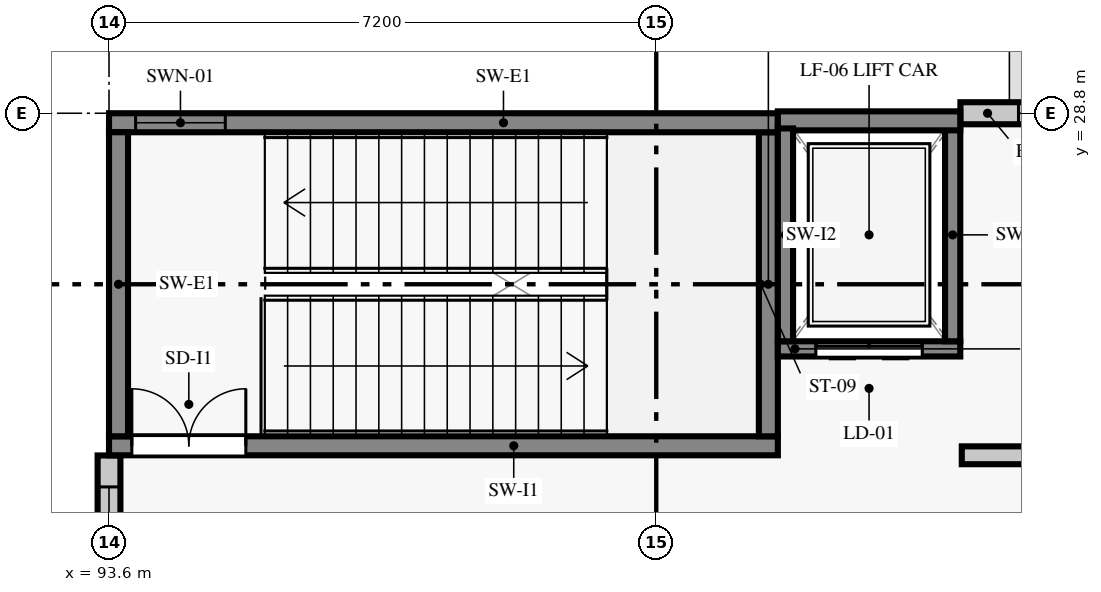
"""IFC4 building model, lengths in metres.
Left out: names, types, materials, properties, quantities, classifications, styles, units other than length and angle.
Written with IfcOpenShell. Run it as: python <this file> out.ifc"""

import sys

from ifc_helpers import new_model, si_unit, direction, frame, frame_2d, origin, place, context, subcontext, project, spatial, rectangle, extrude, element, fill, save


model = new_model("IFC4")
c1 = context("Model", 3, precision=1e-05, world=origin(), true_north=direction((0.0, 1.0)))
c2 = subcontext(c1, "Body", "Model", "MODEL_VIEW")
j1 = project(units=[si_unit("LENGTHUNIT", "METRE"), si_unit("PLANEANGLEUNIT", "RADIAN")], contexts=[c1])
p1 = place(None, origin())
s1 = spatial("IfcSite", under=j1, at=p1, CompositionType="ELEMENT")
p2 = place(p1, origin())
s2 = spatial("IfcBuilding", under=s1, at=p2, CompositionType="ELEMENT")
p3 = place(p2, frame((0.0, 0.0, 4.8)))
s3 = spatial("IfcBuildingStorey", under=s2, at=p3, CompositionType="ELEMENT", Elevation=4.8)
p4 = place(p3, frame((107.68, 28.8, 0.0), z_axis=(0.0, 0.0, 1.0), x_axis=(-1.0, 0.0, 0.0)))
e1 = element("IfcWall", 1, at=p4, inside=s3, PredefinedType="STANDARD", context=c2, shape_type="SweptSolid", body=[
    extrude(rectangle(XDim=2.878, YDim=0.29, at=frame_2d((1.439, 0.0))), origin(), (0.0, 0.0, 1.0), 4.49),
])
p5 = place(p4, frame((0.764, 0.0, 0.9)))
e2 = element("IfcOpeningElement", 2, at=p5, cuts=e1, PredefinedType="OPENING", context=c2, shape_type="SweptSolid", body=[
    extrude(rectangle(XDim=1.35, YDim=1.78, at=frame_2d((0.675, 0.89))), frame((0.0, 0.155, 0.0), z_axis=(0.0, -1.0, 0.0), x_axis=(1.0, 0.0, 0.0)), (0.0, 0.0, 1.0), 0.31),
])
p6 = place(p3, frame((93.6, 24.298, 0.0), z_axis=(0.0, 0.0, 1.0), x_axis=(0.0, -1.0, 0.0)))
e3 = element("IfcWall", 3, at=p6, inside=s3, PredefinedType="STANDARD", context=c2, shape_type="SweptSolid", body=[
    extrude(rectangle(XDim=2.378, YDim=0.3, at=frame_2d((1.189, 0.0))), origin(), (0.0, 0.0, 1.0), 4.49),
])
p7 = place(p6, frame((0.414, 0.0, 0.9)))
e4 = element("IfcOpeningElement", 4, at=p7, cuts=e3, PredefinedType="OPENING", context=c2, shape_type="SweptSolid", body=[
    extrude(rectangle(XDim=1.55, YDim=1.78, at=frame_2d((0.775, 0.89))), frame((0.0, 0.16, 0.0), z_axis=(0.0, -1.0, 0.0), x_axis=(1.0, 0.0, 0.0)), (0.0, 0.0, 1.0), 0.32),
])
p8 = place(p3, frame((93.6, 24.425, 0.0), z_axis=(0.0, 0.0, 1.0), x_axis=(1.0, 0.0, 0.0)))
e5 = element("IfcWall", 5, at=p8, inside=s3, PredefinedType="SHEAR", context=c2, shape_type="SweptSolid", body=[
    extrude(rectangle(XDim=8.8, YDim=0.25, at=frame_2d((4.4, 0.0))), origin(), (0.0, 0.0, 1.0), 4.49),
])
p9 = place(p8, frame((0.3, 0.0, 0.0)))
e6 = element("IfcOpeningElement", 6, at=p9, cuts=e5, PredefinedType="OPENING", context=c2, shape_type="SweptSolid", body=[
    extrude(rectangle(XDim=1.5, YDim=2.15, at=frame_2d((0.75, 1.075))), frame((0.0, 0.135, 0.0), z_axis=(0.0, -1.0, 0.0), x_axis=(1.0, 0.0, 0.0)), (0.0, 0.0, 1.0), 0.27),
])
p10 = place(p3, frame((102.275, 24.55, 0.0), z_axis=(0.0, 0.0, 1.0), x_axis=(0.0, 1.0, 0.0)))
e7 = element("IfcWall", 7, at=p10, inside=s3, PredefinedType="SHEAR", context=c2, shape_type="SweptSolid", body=[
    extrude(rectangle(XDim=4.0, YDim=0.25, at=frame_2d((2.0, 0.0))), origin(), (0.0, 0.0, 1.0), 4.49),
])
p11 = place(p3, frame((102.4, 28.675, 0.0), z_axis=(0.0, 0.0, 1.0), x_axis=(-1.0, 0.0, 0.0)))
e8 = element("IfcWall", 8, at=p11, inside=s3, PredefinedType="SHEAR", context=c2, shape_type="SweptSolid", body=[
    extrude(rectangle(XDim=8.8, YDim=0.25, at=frame_2d((4.4, 0.0))), origin(), (0.0, 0.0, 1.0), 4.49),
])
p12 = place(p11, frame((7.27, 0.0, 0.92)))
e9 = element("IfcOpeningElement", 9, at=p12, cuts=e8, PredefinedType="OPENING", context=c2, shape_type="SweptSolid", body=[
    extrude(rectangle(XDim=1.18, YDim=1.48, at=frame_2d((0.59, 0.74))), frame((0.0, 0.135, 0.0), z_axis=(0.0, -1.0, 0.0), x_axis=(1.0, 0.0, 0.0)), (0.0, 0.0, 1.0), 0.27),
])
p13 = place(p3, frame((93.725, 28.55, 0.0), z_axis=(0.0, 0.0, 1.0), x_axis=(0.0, -1.0, 0.0)))
e10 = element("IfcWall", 10, at=p13, inside=s3, PredefinedType="SHEAR", context=c2, shape_type="SweptSolid", body=[
    extrude(rectangle(XDim=4.0, YDim=0.25, at=frame_2d((2.0, 0.0))), origin(), (0.0, 0.0, 1.0), 4.49),
])
p14 = place(p3, frame((102.4, 25.7, 0.0), z_axis=(0.0, 0.0, 1.0), x_axis=(1.0, 0.0, 0.0)))
e11 = element("IfcWall", 11, at=p14, inside=s3, PredefinedType="SHEAR", context=c2, shape_type="SweptSolid", body=[
    extrude(rectangle(XDim=2.4, YDim=0.2, at=frame_2d((1.2, 0.0))), origin(), (0.0, 0.0, 1.0), 4.49),
])
p15 = place(p14, frame((0.5, 0.0, 0.0)))
e12 = element("IfcOpeningElement", 12, at=p15, cuts=e11, PredefinedType="OPENING", context=c2, shape_type="SweptSolid", body=[
    extrude(rectangle(XDim=1.4, YDim=2.15, at=frame_2d((0.7, 1.075))), frame((0.0, 0.11, 0.0), z_axis=(0.0, -1.0, 0.0), x_axis=(1.0, 0.0, 0.0)), (0.0, 0.0, 1.0), 0.22),
])
p16 = place(p3, frame((104.7, 25.8, 0.0), z_axis=(0.0, 0.0, 1.0), x_axis=(0.0, 1.0, 0.0)))
e13 = element("IfcWall", 13, at=p16, inside=s3, PredefinedType="SHEAR", context=c2, shape_type="SweptSolid", body=[
    extrude(rectangle(XDim=2.8, YDim=0.2, at=frame_2d((1.4, 0.0))), origin(), (0.0, 0.0, 1.0), 4.49),
])
p17 = place(p3, frame((104.8, 28.7, 0.0), z_axis=(0.0, 0.0, 1.0), x_axis=(-1.0, 0.0, 0.0)))
e14 = element("IfcWall", 14, at=p17, inside=s3, PredefinedType="SHEAR", context=c2, shape_type="SweptSolid", body=[
    extrude(rectangle(XDim=2.4, YDim=0.25, at=frame_2d((1.2, 0.0))), origin(), (0.0, 0.0, 1.0), 4.49),
])
p18 = place(p3, frame((102.5, 28.6, 0.0), z_axis=(0.0, 0.0, 1.0), x_axis=(0.0, -1.0, 0.0)))
e15 = element("IfcWall", 15, at=p18, inside=s3, PredefinedType="SHEAR", context=c2, shape_type="SweptSolid", body=[
    extrude(rectangle(XDim=2.8, YDim=0.2, at=frame_2d((1.4, 0.0))), origin(), (0.0, 0.0, 1.0), 4.49),
])
p19 = place(p3, frame((104.82, 24.3, 0.0), z_axis=(0.0, 0.0, 1.0), x_axis=(1.0, 0.0, 0.0)))
e16 = element("IfcWall", 16, at=p19, inside=s3, PredefinedType="PARTITIONING", context=c2, shape_type="SweptSolid", body=[
    extrude(rectangle(XDim=8.76, YDim=0.235, at=frame_2d((4.38, 0.0))), origin(), (0.0, 0.0, 1.0), 3.94),
])
p20 = place(p19, frame((6.545, 0.0, 0.0)))
e17 = element("IfcOpeningElement", 17, at=p20, cuts=e16, PredefinedType="OPENING", context=c2, shape_type="SweptSolid", body=[
    extrude(rectangle(XDim=1.04, YDim=2.23, at=frame_2d((0.52, 1.115))), frame((0.0, 0.127, 0.0), z_axis=(0.0, -1.0, 0.0), x_axis=(1.0, 0.0, 0.0)), (0.0, 0.0, 1.0), 0.255),
])
p21 = place(p5, origin())
e18 = element("IfcWindow", 18, at=p21, inside=s3, PartitioningType="SINGLE_PANEL", PredefinedType="WINDOW", context=c2, shape_type="SweptSolid", body=[
    extrude(rectangle(XDim=1.35, YDim=1.78, at=frame_2d((0.675, 0.89))), frame((0.0, 0.03, 0.0), z_axis=(0.0, -1.0, 0.0), x_axis=(1.0, 0.0, 0.0)), (0.0, 0.0, 1.0), 0.06),
])
fill(e2, e18)
p22 = place(p7, origin())
e19 = element("IfcWindow", 19, at=p22, inside=s3, PartitioningType="SINGLE_PANEL", PredefinedType="WINDOW", context=c2, shape_type="SweptSolid", body=[
    extrude(rectangle(XDim=1.55, YDim=1.78, at=frame_2d((0.775, 0.89))), frame((0.0, 0.03, 0.0), z_axis=(0.0, -1.0, 0.0), x_axis=(1.0, 0.0, 0.0)), (0.0, 0.0, 1.0), 0.06),
])
fill(e4, e19)
p23 = place(p9, origin())
e20 = element("IfcDoor", 20, at=p23, inside=s3, OperationType="DOUBLE_DOOR_SINGLE_SWING", PredefinedType="DOOR", context=c2, shape_type="SweptSolid", body=[
    extrude(rectangle(XDim=1.5, YDim=2.15, at=frame_2d((0.75, 1.075))), frame((0.0, 0.025, 0.0), z_axis=(0.0, -1.0, 0.0), x_axis=(1.0, 0.0, 0.0)), (0.0, 0.0, 1.0), 0.05),
])
fill(e6, e20)
p24 = place(p12, origin())
e21 = element("IfcWindow", 21, at=p24, inside=s3, PartitioningType="SINGLE_PANEL", PredefinedType="WINDOW", context=c2, shape_type="SweptSolid", body=[
    extrude(rectangle(XDim=1.18, YDim=1.48, at=frame_2d((0.59, 0.74))), frame((0.0, 0.03, 0.0), z_axis=(0.0, -1.0, 0.0), x_axis=(1.0, 0.0, 0.0)), (0.0, 0.0, 1.0), 0.06),
])
fill(e9, e21)
p25 = place(p15, frame((1.4, 0.0, 0.0), z_axis=(0.0, 0.0, 1.0), x_axis=(-1.0, 0.0, 0.0)))
e22 = element("IfcDoor", 22, at=p25, inside=s3, OperationType="DOUBLE_DOOR_SLIDING", PredefinedType="DOOR", context=c2, shape_type="SweptSolid", body=[
    extrude(rectangle(XDim=1.4, YDim=2.15, at=frame_2d((0.7, 1.075))), frame((0.0, 0.025, 0.0), z_axis=(0.0, -1.0, 0.0), x_axis=(1.0, 0.0, 0.0)), (0.0, 0.0, 1.0), 0.05),
])
fill(e12, e22)
save(model, sys.argv[1])
